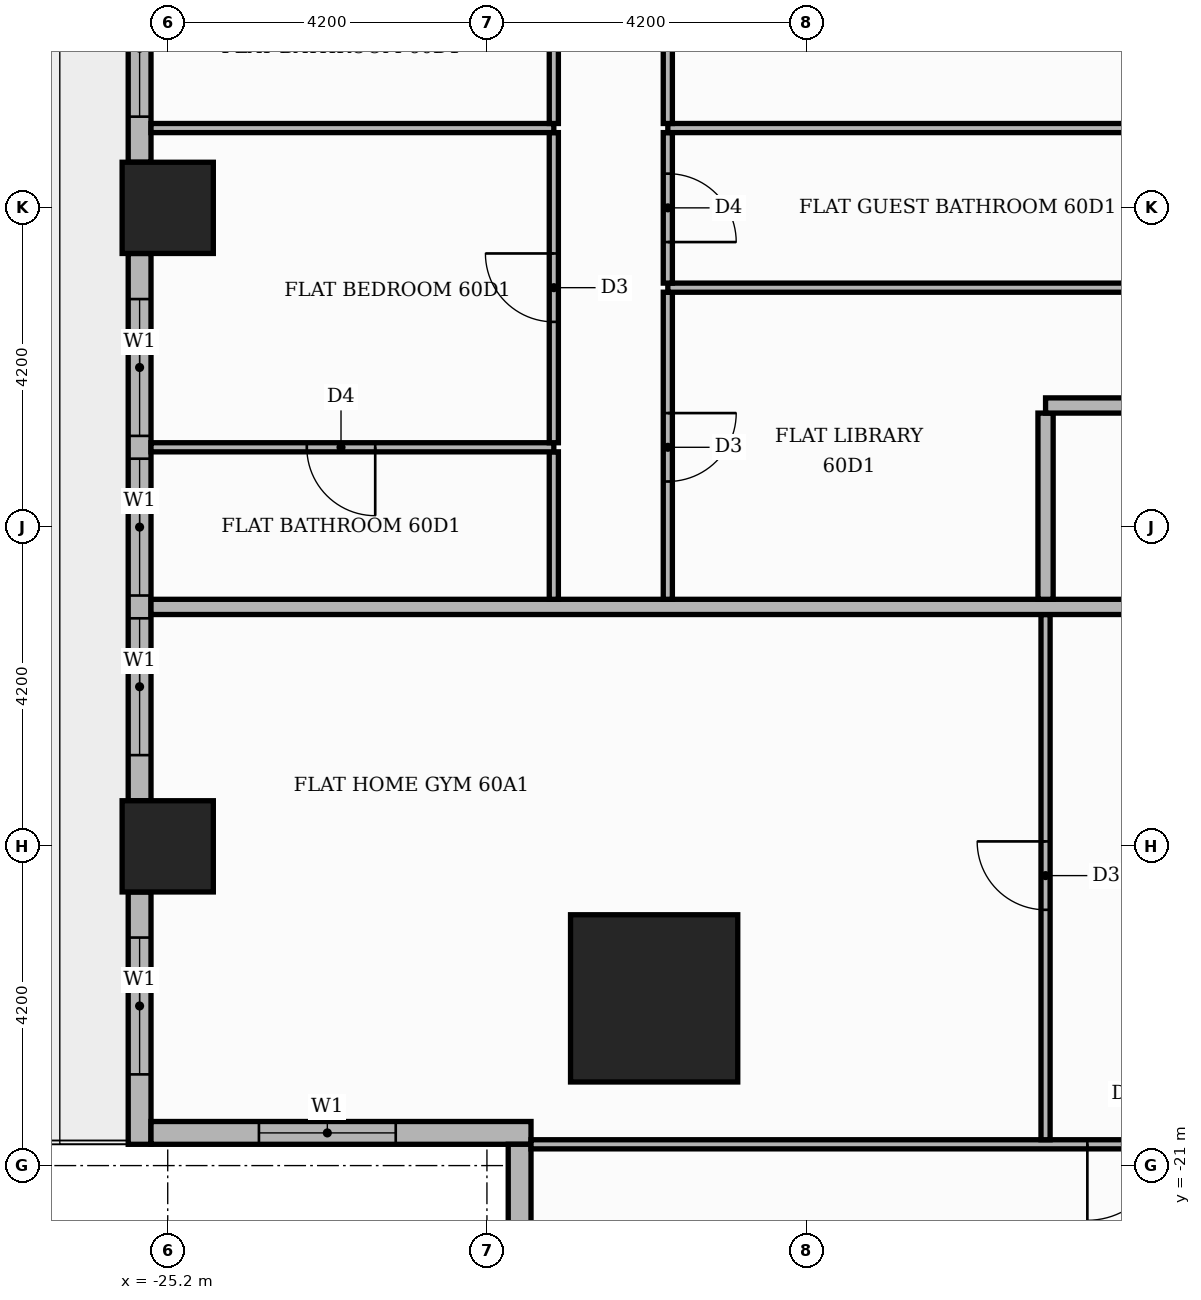
"""IFC4 building model, lengths in metres.
Left out: names, types, materials, properties, quantities, classifications, styles, units other than length and angle.
Written with IfcOpenShell. Run it as: python <this file> out.ifc"""

import sys

from ifc_helpers import new_model, si_unit, direction, frame, frame_2d, origin, origin_2d, place, context, subcontext, project, spatial, rectangle, extrude, element, fill, save


model = new_model("IFC4")
c1 = context("Model", 3, precision=1e-05, world=origin(), true_north=direction((0.0, 1.0)))
c2 = subcontext(c1, "Body", "Model", "MODEL_VIEW")
j1 = project(units=[si_unit("LENGTHUNIT", "METRE"), si_unit("PLANEANGLEUNIT", "RADIAN")], contexts=[c1])
p1 = place(None, origin())
s1 = spatial("IfcSite", under=j1, at=p1, CompositionType="ELEMENT")
p2 = place(p1, origin())
s2 = spatial("IfcBuilding", under=s1, at=p2, CompositionType="ELEMENT")
p3 = place(p2, frame((0.0, 0.0, 252.3)))
s3 = spatial("IfcBuildingStorey", under=s2, at=p3, CompositionType="ELEMENT", Elevation=252.3)
p4 = place(p3, frame((-18.8, -18.8, 0.0), z_axis=(0.0, 0.0, 1.0), x_axis=(1.0, 0.0, 0.0)))
e1 = element("IfcColumn", 1, at=p4, inside=s3, PredefinedType="COLUMN", context=c2, shape_type="SweptSolid", body=[
    extrude(rectangle(XDim=2.2, YDim=2.2, at=origin_2d()), origin(), (0.0, 0.0, 1.0), 3.9),
])
for number, where, z_axis, x_axis in (
    (2, (-25.2, -8.4, 0.0), (0.0, 0.0, 1.0), (1.0, 0.0, 0.0)),
    (3, (-25.2, -16.8, 0.0), (0.0, 0.0, 1.0), (1.0, 0.0, 0.0)),
):
    element("IfcColumn", number, at=place(p3, frame(where, z_axis=z_axis, x_axis=x_axis)), inside=s3, PredefinedType="COLUMN", context=c2, shape_type="SweptSolid", body=[
        extrude(rectangle(XDim=1.2, YDim=1.2, at=origin_2d()), origin(), (0.0, 0.0, 1.0), 3.9),
    ])
p5 = place(p3, frame((-25.57, -0.6, 0.0), z_axis=(0.0, 0.0, 1.0), x_axis=(0.0, -1.0, 0.0)))
e4 = element("IfcWall", 4, at=p5, inside=s3, PredefinedType="STANDARD", context=c2, shape_type="SweptSolid", body=[
    extrude(rectangle(XDim=7.2, YDim=0.3, at=frame_2d((3.6, 0.0))), origin(), (0.0, 0.0, 1.0), 3.48),
])
p6 = place(p5, frame((0.6, 0.0, 0.9)))
e5 = element("IfcOpeningElement", 5, at=p6, cuts=e4, PredefinedType="OPENING", context=c2, shape_type="SweptSolid", body=[
    extrude(rectangle(XDim=3.9, YDim=2.1, at=frame_2d((1.95, 1.05))), frame((0.0, 0.16, 0.0), z_axis=(0.0, -1.0, 0.0), x_axis=(1.0, 0.0, 0.0)), (0.0, 0.0, 1.0), 0.32),
])
p7 = place(p5, frame((4.8, 0.0, 0.9)))
e6 = element("IfcOpeningElement", 6, at=p7, cuts=e4, PredefinedType="OPENING", context=c2, shape_type="SweptSolid", body=[
    extrude(rectangle(XDim=1.8, YDim=2.1, at=frame_2d((0.9, 1.05))), frame((0.0, 0.16, 0.0), z_axis=(0.0, -1.0, 0.0), x_axis=(1.0, 0.0, 0.0)), (0.0, 0.0, 1.0), 0.32),
])
p8 = place(p3, frame((-25.57, -9.0, 0.0), z_axis=(0.0, 0.0, 1.0), x_axis=(0.0, -1.0, 0.0)))
e7 = element("IfcWall", 7, at=p8, inside=s3, PredefinedType="STANDARD", context=c2, shape_type="SweptSolid", body=[
    extrude(rectangle(XDim=7.2, YDim=0.3, at=frame_2d((3.6, 0.0))), origin(), (0.0, 0.0, 1.0), 3.48),
])
p9 = place(p8, frame((0.6, 0.0, 0.9)))
e8 = element("IfcOpeningElement", 8, at=p9, cuts=e7, PredefinedType="OPENING", context=c2, shape_type="SweptSolid", body=[
    extrude(rectangle(XDim=1.8, YDim=2.1, at=frame_2d((0.9, 1.05))), frame((0.0, 0.16, 0.0), z_axis=(0.0, -1.0, 0.0), x_axis=(1.0, 0.0, 0.0)), (0.0, 0.0, 1.0), 0.32),
])
p10 = place(p8, frame((2.7, 0.0, 0.9)))
e9 = element("IfcOpeningElement", 9, at=p10, cuts=e7, PredefinedType="OPENING", context=c2, shape_type="SweptSolid", body=[
    extrude(rectangle(XDim=1.8, YDim=2.1, at=frame_2d((0.9, 1.05))), frame((0.0, 0.16, 0.0), z_axis=(0.0, -1.0, 0.0), x_axis=(1.0, 0.0, 0.0)), (0.0, 0.0, 1.0), 0.32),
])
p11 = place(p8, frame((4.8, 0.0, 0.9)))
e10 = element("IfcOpeningElement", 10, at=p11, cuts=e7, PredefinedType="OPENING", context=c2, shape_type="SweptSolid", body=[
    extrude(rectangle(XDim=1.8, YDim=2.1, at=frame_2d((0.9, 1.05))), frame((0.0, 0.16, 0.0), z_axis=(0.0, -1.0, 0.0), x_axis=(1.0, 0.0, 0.0)), (0.0, 0.0, 1.0), 0.32),
])
p12 = place(p3, frame((-25.57, -17.4, 0.0), z_axis=(0.0, 0.0, 1.0), x_axis=(0.0, -1.0, 0.0)))
e11 = element("IfcWall", 11, at=p12, inside=s3, PredefinedType="STANDARD", context=c2, shape_type="SweptSolid", body=[
    extrude(rectangle(XDim=3.32, YDim=0.3, at=frame_2d((1.66, 0.0))), origin(), (0.0, 0.0, 1.0), 3.48),
])
p13 = place(p12, frame((0.6, 0.0, 0.9)))
e12 = element("IfcOpeningElement", 12, at=p13, cuts=e11, PredefinedType="OPENING", context=c2, shape_type="SweptSolid", body=[
    extrude(rectangle(XDim=1.8, YDim=2.1, at=frame_2d((0.9, 1.05))), frame((0.0, 0.16, 0.0), z_axis=(0.0, -1.0, 0.0), x_axis=(1.0, 0.0, 0.0)), (0.0, 0.0, 1.0), 0.32),
])
p14 = place(p3, frame((-25.42, -20.57, 0.0), z_axis=(0.0, 0.0, 1.0), x_axis=(1.0, 0.0, 0.0)))
e13 = element("IfcWall", 13, at=p14, inside=s3, PredefinedType="STANDARD", context=c2, shape_type="SweptSolid", body=[
    extrude(rectangle(XDim=5.0, YDim=0.3, at=frame_2d((2.5, 0.0))), origin(), (0.0, 0.0, 1.0), 3.48),
])
p15 = place(p14, frame((1.42, 0.0, 0.9)))
e14 = element("IfcOpeningElement", 14, at=p15, cuts=e13, PredefinedType="OPENING", context=c2, shape_type="SweptSolid", body=[
    extrude(rectangle(XDim=1.8, YDim=2.1, at=frame_2d((0.9, 1.05))), frame((0.0, 0.16, 0.0), z_axis=(0.0, -1.0, 0.0), x_axis=(1.0, 0.0, 0.0)), (0.0, 0.0, 1.0), 0.32),
])
p16 = place(p3, frame((-20.57, -20.72, 0.0), z_axis=(0.0, 0.0, 1.0), x_axis=(0.0, -1.0, 0.0)))
e15 = element("IfcWall", 15, at=p16, inside=s3, PredefinedType="STANDARD", context=c2, shape_type="SweptSolid", body=[
    extrude(rectangle(XDim=5.0, YDim=0.3, at=frame_2d((2.5, 0.0))), origin(), (0.0, 0.0, 1.0), 3.48),
])
p17 = place(p16, frame((1.48, 0.0, 0.9)))
e16 = element("IfcOpeningElement", 16, at=p17, cuts=e15, PredefinedType="OPENING", context=c2, shape_type="SweptSolid", body=[
    extrude(rectangle(XDim=1.8, YDim=2.1, at=frame_2d((0.9, 1.05))), frame((0.0, 0.16, 0.0), z_axis=(0.0, -1.0, 0.0), x_axis=(1.0, 0.0, 0.0)), (0.0, 0.0, 1.0), 0.32),
])
p18 = place(p3, frame((-20.42, -20.72, 0.0), z_axis=(0.0, 0.0, 1.0), x_axis=(1.0, 0.0, 0.0)))
e17 = element("IfcWall", 17, at=p18, inside=s3, PredefinedType="PARTITIONING", context=c2, shape_type="SweptSolid", body=[
    extrude(rectangle(XDim=14.87, YDim=0.12, at=frame_2d((7.435, 0.0))), origin(), (0.0, 0.0, 1.0), 3.48),
])
p19 = place(p18, frame((7.32, 0.0, 0.0)))
e18 = element("IfcOpeningElement", 18, at=p19, cuts=e17, PredefinedType="OPENING", context=c2, shape_type="SweptSolid", body=[
    extrude(rectangle(XDim=1.0, YDim=2.1, at=frame_2d((0.5, 1.05))), frame((0.0, 0.07, 0.0), z_axis=(0.0, -1.0, 0.0), x_axis=(1.0, 0.0, 0.0)), (0.0, 0.0, 1.0), 0.14),
])
p20 = place(p18, frame((11.52, 0.0, 0.0)))
e19 = element("IfcOpeningElement", 19, at=p20, cuts=e17, PredefinedType="OPENING", context=c2, shape_type="SweptSolid", body=[
    extrude(rectangle(XDim=1.0, YDim=2.1, at=frame_2d((0.5, 1.05))), frame((0.0, 0.07, 0.0), z_axis=(0.0, -1.0, 0.0), x_axis=(1.0, 0.0, 0.0)), (0.0, 0.0, 1.0), 0.14),
])
p21 = place(p3, frame((-13.65, -20.66, 0.0), z_axis=(0.0, 0.0, 1.0), x_axis=(0.0, 1.0, 0.0)))
e20 = element("IfcWall", 20, at=p21, inside=s3, PredefinedType="PARTITIONING", context=c2, shape_type="SweptSolid", body=[
    extrude(rectangle(XDim=6.91, YDim=0.12, at=frame_2d((3.455, 0.0))), origin(), (0.0, 0.0, 1.0), 3.48),
])
p22 = place(p21, frame((3.025, 0.0, 0.0)))
e21 = element("IfcOpeningElement", 21, at=p22, cuts=e20, PredefinedType="OPENING", context=c2, shape_type="SweptSolid", body=[
    extrude(rectangle(XDim=0.9, YDim=2.1, at=frame_2d((0.45, 1.05))), frame((0.0, 0.07, 0.0), z_axis=(0.0, -1.0, 0.0), x_axis=(1.0, 0.0, 0.0)), (0.0, 0.0, 1.0), 0.14),
])
p23 = place(p3, frame((-25.42, -13.65, 0.0), z_axis=(0.0, 0.0, 1.0), x_axis=(1.0, 0.0, 0.0)))
e22 = element("IfcWall", 22, at=p23, inside=s3, PredefinedType="PARTITIONING", context=c2, shape_type="SweptSolid", body=[
    extrude(rectangle(XDim=39.07, YDim=0.2, at=frame_2d((19.535, 0.0))), origin(), (0.0, 0.0, 1.0), 3.48),
])
p24 = place(p23, frame((14.37, 0.0, 0.0)))
e23 = element("IfcOpeningElement", 23, at=p24, cuts=e22, PredefinedType="OPENING", context=c2, shape_type="SweptSolid", body=[
    extrude(rectangle(XDim=1.1, YDim=2.4, at=frame_2d((0.55, 1.2))), frame((0.0, 0.11, 0.0), z_axis=(0.0, -1.0, 0.0), x_axis=(1.0, 0.0, 0.0)), (0.0, 0.0, 1.0), 0.22),
])
p25 = place(p3, frame((-20.12, -13.55, 0.0), z_axis=(0.0, 0.0, 1.0), x_axis=(0.0, 1.0, 0.0)))
e24 = element("IfcWall", 24, at=p25, inside=s3, PredefinedType="PARTITIONING", context=c2, shape_type="SweptSolid", body=[
    extrude(rectangle(XDim=1.94, YDim=0.12, at=frame_2d((0.97, 0.0))), origin(), (0.0, 0.0, 1.0), 3.48),
])
p26 = place(p3, frame((-18.62, -13.55, 0.0), z_axis=(0.0, 0.0, 1.0), x_axis=(0.0, 1.0, 0.0)))
e25 = element("IfcWall", 25, at=p26, inside=s3, PredefinedType="PARTITIONING", context=c2, shape_type="SweptSolid", body=[
    extrude(rectangle(XDim=4.04, YDim=0.12, at=frame_2d((2.02, 0.0))), origin(), (0.0, 0.0, 1.0), 3.48),
])
p27 = place(p26, frame((1.55, 0.0, 0.0)))
e26 = element("IfcOpeningElement", 26, at=p27, cuts=e25, PredefinedType="OPENING", context=c2, shape_type="SweptSolid", body=[
    extrude(rectangle(XDim=0.9, YDim=2.1, at=frame_2d((0.45, 1.05))), frame((0.0, 0.07, 0.0), z_axis=(0.0, -1.0, 0.0), x_axis=(1.0, 0.0, 0.0)), (0.0, 0.0, 1.0), 0.14),
])
p28 = place(p3, frame((-13.65, -13.55, 0.0), z_axis=(0.0, 0.0, 1.0), x_axis=(0.0, 1.0, 0.0)))
e27 = element("IfcWall", 27, at=p28, inside=s3, PredefinedType="PARTITIONING", context=c2, shape_type="SweptSolid", body=[
    extrude(rectangle(XDim=2.45, YDim=0.2, at=frame_2d((1.225, 0.0))), origin(), (0.0, 0.0, 1.0), 3.48),
])
p29 = place(p3, frame((-25.42, -11.55, 0.0), z_axis=(0.0, 0.0, 1.0), x_axis=(1.0, 0.0, 0.0)))
e28 = element("IfcWall", 28, at=p29, inside=s3, PredefinedType="PARTITIONING", context=c2, shape_type="SweptSolid", body=[
    extrude(rectangle(XDim=5.3, YDim=0.12, at=frame_2d((2.65, 0.0))), origin(), (0.0, 0.0, 1.0), 3.48),
])
p30 = place(p29, frame((2.05, 0.0, 0.0)))
e29 = element("IfcOpeningElement", 29, at=p30, cuts=e28, PredefinedType="OPENING", context=c2, shape_type="SweptSolid", body=[
    extrude(rectangle(XDim=0.9, YDim=2.1, at=frame_2d((0.45, 1.05))), frame((0.0, 0.07, 0.0), z_axis=(0.0, -1.0, 0.0), x_axis=(1.0, 0.0, 0.0)), (0.0, 0.0, 1.0), 0.14),
])
p31 = place(p3, frame((-20.12, -11.49, 0.0), z_axis=(0.0, 0.0, 1.0), x_axis=(0.0, 1.0, 0.0)))
e30 = element("IfcWall", 30, at=p31, inside=s3, PredefinedType="PARTITIONING", context=c2, shape_type="SweptSolid", body=[
    extrude(rectangle(XDim=4.08, YDim=0.12, at=frame_2d((2.04, 0.0))), origin(), (0.0, 0.0, 1.0), 3.48),
])
p32 = place(p31, frame((1.59, 0.0, 0.0)))
e31 = element("IfcOpeningElement", 31, at=p32, cuts=e30, PredefinedType="OPENING", context=c2, shape_type="SweptSolid", body=[
    extrude(rectangle(XDim=0.9, YDim=2.1, at=frame_2d((0.45, 1.05))), frame((0.0, 0.07, 0.0), z_axis=(0.0, -1.0, 0.0), x_axis=(1.0, 0.0, 0.0)), (0.0, 0.0, 1.0), 0.14),
])
p33 = place(p3, frame((-13.65, -11.0, 0.0), z_axis=(0.0, 0.0, 1.0), x_axis=(1.0, 0.0, 0.0)))
e32 = element("IfcWall", 32, at=p33, inside=s3, PredefinedType="PARTITIONING", context=c2, shape_type="SweptSolid", body=[
    extrude(rectangle(XDim=2.65, YDim=0.2, at=frame_2d((1.325, 0.0))), origin(), (0.0, 0.0, 1.0), 3.48),
])
p34 = place(p3, frame((-18.62, -9.45, 0.0), z_axis=(0.0, 0.0, 1.0), x_axis=(1.0, 0.0, 0.0)))
e33 = element("IfcWall", 33, at=p34, inside=s3, PredefinedType="PARTITIONING", context=c2, shape_type="SweptSolid", body=[
    extrude(rectangle(XDim=7.62, YDim=0.12, at=frame_2d((3.81, 0.0))), origin(), (0.0, 0.0, 1.0), 3.48),
])
p35 = place(p3, frame((-18.62, -9.39, 0.0), z_axis=(0.0, 0.0, 1.0), x_axis=(0.0, 1.0, 0.0)))
e34 = element("IfcWall", 34, at=p35, inside=s3, PredefinedType="PARTITIONING", context=c2, shape_type="SweptSolid", body=[
    extrude(rectangle(XDim=1.98, YDim=0.12, at=frame_2d((0.99, 0.0))), origin(), (0.0, 0.0, 1.0), 3.48),
])
p36 = place(p35, frame((0.54, 0.0, 0.0)))
e35 = element("IfcOpeningElement", 35, at=p36, cuts=e34, PredefinedType="OPENING", context=c2, shape_type="SweptSolid", body=[
    extrude(rectangle(XDim=0.9, YDim=2.1, at=frame_2d((0.45, 1.05))), frame((0.0, 0.07, 0.0), z_axis=(0.0, -1.0, 0.0), x_axis=(1.0, 0.0, 0.0)), (0.0, 0.0, 1.0), 0.14),
])
p37 = place(p3, frame((-25.42, -7.35, 0.0), z_axis=(0.0, 0.0, 1.0), x_axis=(1.0, 0.0, 0.0)))
e36 = element("IfcWall", 36, at=p37, inside=s3, PredefinedType="PARTITIONING", context=c2, shape_type="SweptSolid", body=[
    extrude(rectangle(XDim=5.3, YDim=0.12, at=frame_2d((2.65, 0.0))), origin(), (0.0, 0.0, 1.0), 3.48),
])
p38 = place(p3, frame((-18.62, -7.35, 0.0), z_axis=(0.0, 0.0, 1.0), x_axis=(1.0, 0.0, 0.0)))
e37 = element("IfcWall", 37, at=p38, inside=s3, PredefinedType="PARTITIONING", context=c2, shape_type="SweptSolid", body=[
    extrude(rectangle(XDim=7.62, YDim=0.12, at=frame_2d((3.81, 0.0))), origin(), (0.0, 0.0, 1.0), 3.48),
])
p39 = place(p3, frame((-20.12, -7.29, 0.0), z_axis=(0.0, 0.0, 1.0), x_axis=(0.0, 1.0, 0.0)))
e38 = element("IfcWall", 38, at=p39, inside=s3, PredefinedType="PARTITIONING", context=c2, shape_type="SweptSolid", body=[
    extrude(rectangle(XDim=1.98, YDim=0.12, at=frame_2d((0.99, 0.0))), origin(), (0.0, 0.0, 1.0), 3.48),
])
p40 = place(p3, frame((-18.62, -7.29, 0.0), z_axis=(0.0, 0.0, 1.0), x_axis=(0.0, 1.0, 0.0)))
e39 = element("IfcWall", 39, at=p40, inside=s3, PredefinedType="PARTITIONING", context=c2, shape_type="SweptSolid", body=[
    extrude(rectangle(XDim=3.63, YDim=0.12, at=frame_2d((1.815, 0.0))), origin(), (0.0, 0.0, 1.0), 3.48),
])
p41 = place(p40, frame((1.365, 0.0, 0.0)))
e40 = element("IfcOpeningElement", 40, at=p41, cuts=e39, PredefinedType="OPENING", context=c2, shape_type="SweptSolid", body=[
    extrude(rectangle(XDim=0.9, YDim=2.1, at=frame_2d((0.45, 1.05))), frame((0.0, 0.07, 0.0), z_axis=(0.0, -1.0, 0.0), x_axis=(1.0, 0.0, 0.0)), (0.0, 0.0, 1.0), 0.14),
])
p42 = place(p7, origin())
e41 = element("IfcWindow", 41, at=p42, inside=s3, PartitioningType="SINGLE_PANEL", PredefinedType="WINDOW", context=c2, shape_type="SweptSolid", body=[
    extrude(rectangle(XDim=1.8, YDim=2.1, at=frame_2d((0.9, 1.05))), frame((0.0, 0.03, 0.0), z_axis=(0.0, -1.0, 0.0), x_axis=(1.0, 0.0, 0.0)), (0.0, 0.0, 1.0), 0.06),
])
fill(e6, e41)
p43 = place(p9, origin())
e42 = element("IfcWindow", 42, at=p43, inside=s3, PartitioningType="SINGLE_PANEL", PredefinedType="WINDOW", context=c2, shape_type="SweptSolid", body=[
    extrude(rectangle(XDim=1.8, YDim=2.1, at=frame_2d((0.9, 1.05))), frame((0.0, 0.03, 0.0), z_axis=(0.0, -1.0, 0.0), x_axis=(1.0, 0.0, 0.0)), (0.0, 0.0, 1.0), 0.06),
])
fill(e8, e42)
p44 = place(p10, origin())
e43 = element("IfcWindow", 43, at=p44, inside=s3, PartitioningType="SINGLE_PANEL", PredefinedType="WINDOW", context=c2, shape_type="SweptSolid", body=[
    extrude(rectangle(XDim=1.8, YDim=2.1, at=frame_2d((0.9, 1.05))), frame((0.0, 0.03, 0.0), z_axis=(0.0, -1.0, 0.0), x_axis=(1.0, 0.0, 0.0)), (0.0, 0.0, 1.0), 0.06),
])
fill(e9, e43)
p45 = place(p11, origin())
e44 = element("IfcWindow", 44, at=p45, inside=s3, PartitioningType="SINGLE_PANEL", PredefinedType="WINDOW", context=c2, shape_type="SweptSolid", body=[
    extrude(rectangle(XDim=1.8, YDim=2.1, at=frame_2d((0.9, 1.05))), frame((0.0, 0.03, 0.0), z_axis=(0.0, -1.0, 0.0), x_axis=(1.0, 0.0, 0.0)), (0.0, 0.0, 1.0), 0.06),
])
fill(e10, e44)
p46 = place(p13, origin())
e45 = element("IfcWindow", 45, at=p46, inside=s3, PartitioningType="SINGLE_PANEL", PredefinedType="WINDOW", context=c2, shape_type="SweptSolid", body=[
    extrude(rectangle(XDim=1.8, YDim=2.1, at=frame_2d((0.9, 1.05))), frame((0.0, 0.03, 0.0), z_axis=(0.0, -1.0, 0.0), x_axis=(1.0, 0.0, 0.0)), (0.0, 0.0, 1.0), 0.06),
])
fill(e12, e45)
p47 = place(p15, origin())
e46 = element("IfcWindow", 46, at=p47, inside=s3, PartitioningType="SINGLE_PANEL", PredefinedType="WINDOW", context=c2, shape_type="SweptSolid", body=[
    extrude(rectangle(XDim=1.8, YDim=2.1, at=frame_2d((0.9, 1.05))), frame((0.0, 0.03, 0.0), z_axis=(0.0, -1.0, 0.0), x_axis=(1.0, 0.0, 0.0)), (0.0, 0.0, 1.0), 0.06),
])
fill(e14, e46)
p48 = place(p22, origin())
e47 = element("IfcDoor", 47, at=p48, inside=s3, OperationType="SINGLE_SWING_RIGHT", PredefinedType="DOOR", context=c2, shape_type="SweptSolid", body=[
    extrude(rectangle(XDim=0.9, YDim=2.1, at=frame_2d((0.45, 1.05))), frame((0.0, 0.025, 0.0), z_axis=(0.0, -1.0, 0.0), x_axis=(1.0, 0.0, 0.0)), (0.0, 0.0, 1.0), 0.05),
])
fill(e21, e47)
p49 = place(p19, frame((1.0, 0.0, 0.0), z_axis=(0.0, 0.0, 1.0), x_axis=(-1.0, 0.0, 0.0)))
e48 = element("IfcDoor", 48, at=p49, inside=s3, OperationType="SINGLE_SWING_LEFT", PredefinedType="DOOR", context=c2, shape_type="SweptSolid", body=[
    extrude(rectangle(XDim=1.0, YDim=2.1, at=frame_2d((0.5, 1.05))), frame((0.0, 0.025, 0.0), z_axis=(0.0, -1.0, 0.0), x_axis=(1.0, 0.0, 0.0)), (0.0, 0.0, 1.0), 0.05),
])
fill(e18, e48)
p50 = place(p36, frame((0.9, 0.0, 0.0), z_axis=(0.0, 0.0, 1.0), x_axis=(-1.0, 0.0, 0.0)))
e49 = element("IfcDoor", 49, at=p50, inside=s3, OperationType="SINGLE_SWING_LEFT", PredefinedType="DOOR", context=c2, shape_type="SweptSolid", body=[
    extrude(rectangle(XDim=0.9, YDim=2.1, at=frame_2d((0.45, 1.05))), frame((0.0, 0.025, 0.0), z_axis=(0.0, -1.0, 0.0), x_axis=(1.0, 0.0, 0.0)), (0.0, 0.0, 1.0), 0.05),
])
fill(e35, e49)
p51 = place(p27, frame((0.9, 0.0, 0.0), z_axis=(0.0, 0.0, 1.0), x_axis=(-1.0, 0.0, 0.0)))
e50 = element("IfcDoor", 50, at=p51, inside=s3, OperationType="SINGLE_SWING_RIGHT", PredefinedType="DOOR", context=c2, shape_type="SweptSolid", body=[
    extrude(rectangle(XDim=0.9, YDim=2.1, at=frame_2d((0.45, 1.05))), frame((0.0, 0.025, 0.0), z_axis=(0.0, -1.0, 0.0), x_axis=(1.0, 0.0, 0.0)), (0.0, 0.0, 1.0), 0.05),
])
fill(e26, e50)
p52 = place(p32, origin())
e51 = element("IfcDoor", 51, at=p52, inside=s3, OperationType="SINGLE_SWING_RIGHT", PredefinedType="DOOR", context=c2, shape_type="SweptSolid", body=[
    extrude(rectangle(XDim=0.9, YDim=2.1, at=frame_2d((0.45, 1.05))), frame((0.0, 0.025, 0.0), z_axis=(0.0, -1.0, 0.0), x_axis=(1.0, 0.0, 0.0)), (0.0, 0.0, 1.0), 0.05),
])
fill(e31, e51)
p53 = place(p30, frame((0.9, 0.0, 0.0), z_axis=(0.0, 0.0, 1.0), x_axis=(-1.0, 0.0, 0.0)))
e52 = element("IfcDoor", 52, at=p53, inside=s3, OperationType="SINGLE_SWING_RIGHT", PredefinedType="DOOR", context=c2, shape_type="SweptSolid", body=[
    extrude(rectangle(XDim=0.9, YDim=2.1, at=frame_2d((0.45, 1.05))), frame((0.0, 0.025, 0.0), z_axis=(0.0, -1.0, 0.0), x_axis=(1.0, 0.0, 0.0)), (0.0, 0.0, 1.0), 0.05),
])
fill(e29, e52)
save(model, sys.argv[1])
